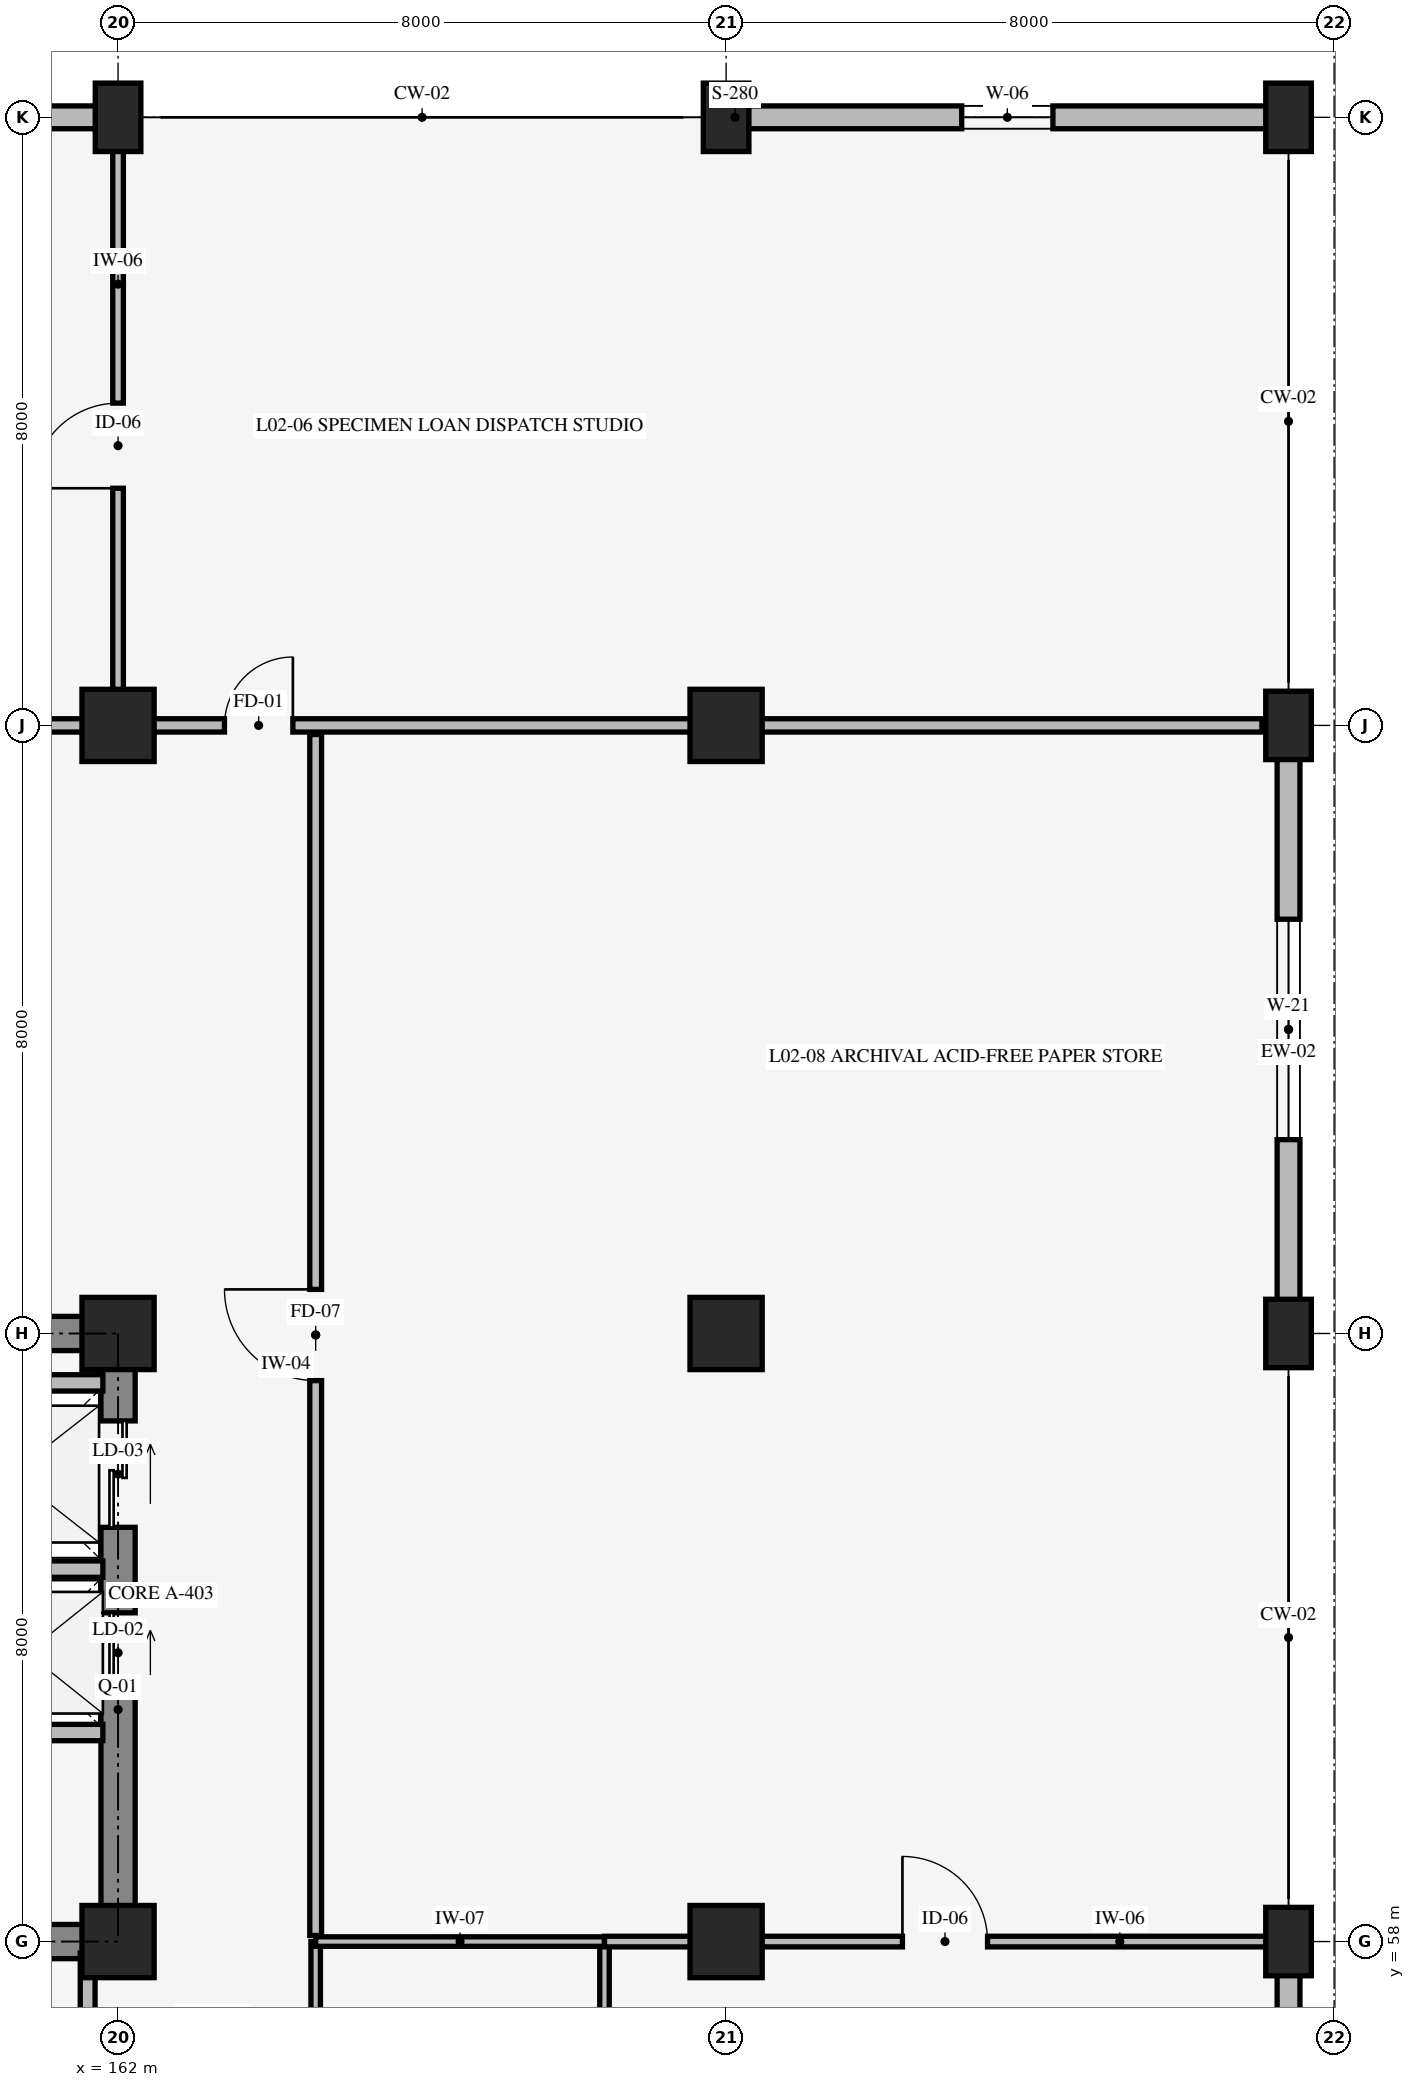
"""IFC4 building model, lengths in metres.
Left out: names, types, materials, properties, quantities, classifications, styles, units other than length and angle.
Written with IfcOpenShell. Run it as: python <this file> out.ifc"""

import sys

from ifc_helpers import new_model, si_unit, direction, frame, frame_2d, origin, origin_2d, place, context, subcontext, project, spatial, rectangle, extrude, element, fill, save


model = new_model("IFC4")
c1 = context("Model", 3, precision=1e-05, world=origin(), true_north=direction((0.0, 1.0)))
c2 = subcontext(c1, "Body", "Model", "MODEL_VIEW")
j1 = project(units=[si_unit("LENGTHUNIT", "METRE"), si_unit("PLANEANGLEUNIT", "RADIAN")], contexts=[c1])
p1 = place(None, origin())
s1 = spatial("IfcSite", under=j1, at=p1, CompositionType="ELEMENT")
p2 = place(p1, origin())
s2 = spatial("IfcBuilding", under=s1, at=p2, CompositionType="ELEMENT")
p3 = place(p2, frame((0.0, 0.0, 5.4)))
s3 = spatial("IfcBuildingStorey", under=s2, at=p3, CompositionType="ELEMENT", Elevation=5.4)
p4 = place(p3, frame((154.0, 58.0, 0.0), z_axis=(0.0, 0.0, 1.0), x_axis=(1.0, 0.0, 0.0)))
e1 = element("IfcWall", 1, at=p4, inside=s3, PredefinedType="SHEAR", context=c2, shape_type="SweptSolid", body=[
    extrude(rectangle(XDim=8.0, YDim=0.45, at=frame_2d((4.0, 0.0))), origin(), (0.0, 0.0, 1.0), 4.55),
])
p5 = place(p4, frame((1.4, 0.0, 0.0)))
e2 = element("IfcOpeningElement", 2, at=p5, cuts=e1, PredefinedType="OPENING", context=c2, shape_type="SweptSolid", body=[
    extrude(rectangle(XDim=1.3, YDim=2.15, at=frame_2d((0.65, 1.075))), frame((0.0, 0.235, 0.0), z_axis=(0.0, -1.0, 0.0), x_axis=(1.0, 0.0, 0.0)), (0.0, 0.0, 1.0), 0.47),
])
p6 = place(p4, frame((5.3, 0.0, 0.0)))
e3 = element("IfcOpeningElement", 3, at=p6, cuts=e1, PredefinedType="OPENING", context=c2, shape_type="SweptSolid", body=[
    extrude(rectangle(XDim=1.1, YDim=2.2, at=frame_2d((0.55, 1.1))), frame((0.0, 0.235, 0.0), z_axis=(0.0, -1.0, 0.0), x_axis=(1.0, 0.0, 0.0)), (0.0, 0.0, 1.0), 0.47),
])
p7 = place(p3, frame((162.0, 58.0, 0.0), z_axis=(0.0, 0.0, 1.0), x_axis=(0.0, 1.0, 0.0)))
e4 = element("IfcWall", 4, at=p7, inside=s3, PredefinedType="SHEAR", context=c2, shape_type="SweptSolid", body=[
    extrude(rectangle(XDim=8.0, YDim=0.45, at=frame_2d((4.0, 0.0))), origin(), (0.0, 0.0, 1.0), 4.55),
])
p8 = place(p7, frame((3.275, 0.0, 0.0)))
e5 = element("IfcOpeningElement", 5, at=p8, cuts=e4, PredefinedType="OPENING", context=c2, shape_type="SweptSolid", body=[
    extrude(rectangle(XDim=1.05, YDim=2.2, at=frame_2d((0.525, 1.1))), frame((0.0, 0.235, 0.0), z_axis=(0.0, -1.0, 0.0), x_axis=(1.0, 0.0, 0.0)), (0.0, 0.0, 1.0), 0.47),
])
p9 = place(p7, frame((5.45, 0.0, 0.0)))
e6 = element("IfcOpeningElement", 6, at=p9, cuts=e4, PredefinedType="OPENING", context=c2, shape_type="SweptSolid", body=[
    extrude(rectangle(XDim=1.4, YDim=2.3, at=frame_2d((0.7, 1.15))), frame((0.0, 0.235, 0.0), z_axis=(0.0, -1.0, 0.0), x_axis=(1.0, 0.0, 0.0)), (0.0, 0.0, 1.0), 0.47),
])
p10 = place(p3, frame((162.0, 66.0, 0.0), z_axis=(0.0, 0.0, 1.0), x_axis=(-1.0, 0.0, 0.0)))
e7 = element("IfcWall", 7, at=p10, inside=s3, PredefinedType="SHEAR", context=c2, shape_type="SweptSolid", body=[
    extrude(rectangle(XDim=8.0, YDim=0.45, at=frame_2d((4.0, 0.0))), origin(), (0.0, 0.0, 1.0), 4.55),
])
for number, where, z_axis, x_axis in (
    (8, (162.0, 58.0, 0.0), (0.0, 0.0, 1.0), (1.0, 0.0, 0.0)),
    (9, (162.0, 66.0, 0.0), (0.0, 0.0, 1.0), (1.0, 0.0, 0.0)),
    (10, (162.0, 74.0, 0.0), (0.0, 0.0, 1.0), (1.0, 0.0, 0.0)),
):
    element("IfcColumn", number, at=place(p3, frame(where, z_axis=z_axis, x_axis=x_axis)), inside=s3, PredefinedType="COLUMN", context=c2, shape_type="SweptSolid", body=[
        extrude(rectangle(XDim=0.95, YDim=0.95, at=origin_2d()), origin(), (0.0, 0.0, 1.0), 4.8),
    ])
p11 = place(p3, frame((162.0, 82.0, 0.0), z_axis=(0.0, 0.0, 1.0), x_axis=(1.0, 0.0, 0.0)))
e11 = element("IfcColumn", 11, at=p11, inside=s3, PredefinedType="COLUMN", context=c2, shape_type="SweptSolid", body=[
    extrude(rectangle(XDim=0.6, YDim=0.9, at=origin_2d()), origin(), (0.0, 0.0, 1.0), 4.8),
])
for number, where, z_axis, x_axis in (
    (12, (170.0, 58.0, 0.0), (0.0, 0.0, 1.0), (1.0, 0.0, 0.0)),
    (13, (170.0, 66.0, 0.0), (0.0, 0.0, 1.0), (1.0, 0.0, 0.0)),
    (14, (170.0, 74.0, 0.0), (0.0, 0.0, 1.0), (1.0, 0.0, 0.0)),
):
    element("IfcColumn", number, at=place(p3, frame(where, z_axis=z_axis, x_axis=x_axis)), inside=s3, PredefinedType="COLUMN", context=c2, shape_type="SweptSolid", body=[
        extrude(rectangle(XDim=0.95, YDim=0.95, at=origin_2d()), origin(), (0.0, 0.0, 1.0), 4.8),
    ])
for number, where, z_axis, x_axis in (
    (15, (170.0, 82.0, 0.0), (0.0, 0.0, 1.0), (1.0, 0.0, 0.0)),
    (16, (177.4, 58.0, 0.0), (0.0, 0.0, 1.0), (1.0, 0.0, 0.0)),
    (17, (177.4, 66.0, 0.0), (0.0, 0.0, 1.0), (1.0, 0.0, 0.0)),
    (18, (177.4, 74.0, 0.0), (0.0, 0.0, 1.0), (1.0, 0.0, 0.0)),
    (19, (177.4, 82.0, 0.0), (0.0, 0.0, 1.0), (1.0, 0.0, 0.0)),
):
    element("IfcColumn", number, at=place(p3, frame(where, z_axis=z_axis, x_axis=x_axis)), inside=s3, PredefinedType="COLUMN", context=c2, shape_type="SweptSolid", body=[
        extrude(rectangle(XDim=0.6, YDim=0.9, at=origin_2d()), origin(), (0.0, 0.0, 1.0), 4.8),
    ])
p12 = place(p3, frame((154.0, 82.0, 0.0), z_axis=(0.0, 0.0, 1.0), x_axis=(1.0, 0.0, 0.0)))
e20 = element("IfcWall", 20, at=p12, inside=s3, PredefinedType="STANDARD", context=c2, shape_type="SweptSolid", body=[
    extrude(rectangle(XDim=8.0, YDim=0.3, at=frame_2d((4.0, 0.0))), origin(), (0.0, 0.0, 1.0), 3.6),
])
p13 = place(p12, frame((2.85, 0.0, 0.85)))
e21 = element("IfcOpeningElement", 21, at=p13, cuts=e20, PredefinedType="OPENING", context=c2, shape_type="SweptSolid", body=[
    extrude(rectangle(XDim=2.3, YDim=1.5, at=frame_2d((1.15, 0.75))), frame((0.0, 0.16, 0.0), z_axis=(0.0, -1.0, 0.0), x_axis=(1.0, 0.0, 0.0)), (0.0, 0.0, 1.0), 0.32),
])
p14 = place(p3, frame((170.0, 82.0, 0.0), z_axis=(0.0, 0.0, 1.0), x_axis=(1.0, 0.0, 0.0)))
e22 = element("IfcWall", 22, at=p14, inside=s3, PredefinedType="STANDARD", context=c2, shape_type="SweptSolid", body=[
    extrude(rectangle(XDim=7.4, YDim=0.3, at=frame_2d((3.7, 0.0))), origin(), (0.0, 0.0, 1.0), 3.6),
])
p15 = place(p14, frame((3.1, 0.0, 0.85)))
e23 = element("IfcOpeningElement", 23, at=p15, cuts=e22, PredefinedType="OPENING", context=c2, shape_type="SweptSolid", body=[
    extrude(rectangle(XDim=1.2, YDim=1.2, at=frame_2d((0.6, 0.6))), frame((0.0, 0.16, 0.0), z_axis=(0.0, -1.0, 0.0), x_axis=(1.0, 0.0, 0.0)), (0.0, 0.0, 1.0), 0.32),
])
p16 = place(p3, frame((177.4, 74.0, 0.0), z_axis=(0.0, 0.0, 1.0), x_axis=(0.0, -1.0, 0.0)))
e24 = element("IfcWall", 24, at=p16, inside=s3, PredefinedType="STANDARD", context=c2, shape_type="SweptSolid", body=[
    extrude(rectangle(XDim=8.0, YDim=0.3, at=frame_2d((4.0, 0.0))), origin(), (0.0, 0.0, 1.0), 3.55),
])
p17 = place(p16, frame((2.55, 0.0, 0.85)))
e25 = element("IfcOpeningElement", 25, at=p17, cuts=e24, PredefinedType="OPENING", context=c2, shape_type="SweptSolid", body=[
    extrude(rectangle(XDim=2.9, YDim=1.7, at=frame_2d((1.45, 0.85))), frame((0.0, 0.16, 0.0), z_axis=(0.0, -1.0, 0.0), x_axis=(1.0, 0.0, 0.0)), (0.0, 0.0, 1.0), 0.32),
])
p18 = place(p3, frame((177.4, 58.0, 0.0), z_axis=(0.0, 0.0, 1.0), x_axis=(0.0, -1.0, 0.0)))
e26 = element("IfcWall", 26, at=p18, inside=s3, PredefinedType="STANDARD", context=c2, shape_type="SweptSolid", body=[
    extrude(rectangle(XDim=8.0, YDim=0.3, at=frame_2d((4.0, 0.0))), origin(), (0.0, 0.0, 1.0), 3.55),
])
p19 = place(p18, frame((3.05, 0.0, 0.85)))
e27 = element("IfcOpeningElement", 27, at=p19, cuts=e26, PredefinedType="OPENING", context=c2, shape_type="SweptSolid", body=[
    extrude(rectangle(XDim=1.9, YDim=1.3, at=frame_2d((0.95, 0.65))), frame((0.0, 0.16, 0.0), z_axis=(0.0, -1.0, 0.0), x_axis=(1.0, 0.0, 0.0)), (0.0, 0.0, 1.0), 0.32),
])
p20 = place(p3, frame((158.45, 62.9, 0.0), z_axis=(0.0, 0.0, 1.0), x_axis=(1.0, 0.0, 0.0)))
e28 = element("IfcWall", 28, at=p20, inside=s3, PredefinedType="STANDARD", context=c2, shape_type="SweptSolid", body=[
    extrude(rectangle(XDim=3.35, YDim=0.215, at=frame_2d((1.675, 0.0))), origin(), (0.0, 0.0, 1.0), 4.5),
])
p21 = place(p3, frame((159.38, 65.35, 0.0), z_axis=(0.0, 0.0, 1.0), x_axis=(1.0, 0.0, 0.0)))
e29 = element("IfcWall", 29, at=p21, inside=s3, PredefinedType="STANDARD", context=c2, shape_type="SweptSolid", body=[
    extrude(rectangle(XDim=2.42, YDim=0.215, at=frame_2d((1.21, 0.0))), origin(), (0.0, 0.0, 1.0), 4.5),
])
p22 = place(p3, frame((158.45, 60.75, 0.0), z_axis=(0.0, 0.0, 1.0), x_axis=(1.0, 0.0, 0.0)))
e30 = element("IfcWall", 30, at=p22, inside=s3, PredefinedType="STANDARD", context=c2, shape_type="SweptSolid", body=[
    extrude(rectangle(XDim=3.35, YDim=0.215, at=frame_2d((1.675, 0.0))), origin(), (0.0, 0.0, 1.0), 4.5),
])
p23 = place(p3, frame((161.6, 55.2, 0.0), z_axis=(0.0, 0.0, 1.0), x_axis=(0.0, 1.0, 0.0)))
e31 = element("IfcWall", 31, at=p23, inside=s3, PredefinedType="STANDARD", context=c2, shape_type="SweptSolid", body=[
    extrude(rectangle(XDim=2.65, YDim=0.195, at=frame_2d((1.325, 0.0))), origin(), (0.0, 0.0, 1.0), 3.55),
])
p24 = place(p3, frame((164.6, 50.0, 0.0), z_axis=(0.0, 0.0, 1.0), x_axis=(0.0, 1.0, 0.0)))
e32 = element("IfcWall", 32, at=p24, inside=s3, PredefinedType="STANDARD", context=c2, shape_type="SweptSolid", body=[
    extrude(rectangle(XDim=8.0, YDim=0.125, at=frame_2d((4.0, 0.0))), origin(), (0.0, 0.0, 1.0), 4.5),
])
p25 = place(p24, frame((0.9, 0.0, 0.0)))
e33 = element("IfcOpeningElement", 33, at=p25, cuts=e32, PredefinedType="OPENING", context=c2, shape_type="SweptSolid", body=[
    extrude(rectangle(XDim=0.96, YDim=2.08, at=frame_2d((0.48, 1.04))), frame((0.0, 0.073, 0.0), z_axis=(0.0, -1.0, 0.0), x_axis=(1.0, 0.0, 0.0)), (0.0, 0.0, 1.0), 0.145),
])
p26 = place(p24, frame((3.55, 0.0, 0.0)))
e34 = element("IfcOpeningElement", 34, at=p26, cuts=e32, PredefinedType="OPENING", context=c2, shape_type="SweptSolid", body=[
    extrude(rectangle(XDim=0.88, YDim=2.05, at=frame_2d((0.44, 1.025))), frame((0.0, 0.073, 0.0), z_axis=(0.0, -1.0, 0.0), x_axis=(1.0, 0.0, 0.0)), (0.0, 0.0, 1.0), 0.145),
])
p27 = place(p24, frame((6.15, 0.0, 0.0)))
e35 = element("IfcOpeningElement", 35, at=p27, cuts=e32, PredefinedType="OPENING", context=c2, shape_type="SweptSolid", body=[
    extrude(rectangle(XDim=0.92, YDim=2.05, at=frame_2d((0.46, 1.025))), frame((0.0, 0.073, 0.0), z_axis=(0.0, -1.0, 0.0), x_axis=(1.0, 0.0, 0.0)), (0.0, 0.0, 1.0), 0.145),
])
p28 = place(p3, frame((168.4, 50.0, 0.0), z_axis=(0.0, 0.0, 1.0), x_axis=(0.0, 1.0, 0.0)))
e36 = element("IfcWall", 36, at=p28, inside=s3, PredefinedType="STANDARD", context=c2, shape_type="SweptSolid", body=[
    extrude(rectangle(XDim=8.0, YDim=0.125, at=frame_2d((4.0, 0.0))), origin(), (0.0, 0.0, 1.0), 4.5),
])
p29 = place(p3, frame((164.6, 58.0, 0.0), z_axis=(0.0, 0.0, 1.0), x_axis=(1.0, 0.0, 0.0)))
e37 = element("IfcWall", 37, at=p29, inside=s3, PredefinedType="STANDARD", context=c2, shape_type="SweptSolid", body=[
    extrude(rectangle(XDim=3.8, YDim=0.125, at=frame_2d((1.9, 0.0))), origin(), (0.0, 0.0, 1.0), 3.6),
])
p30 = place(p3, frame((168.4, 58.0, 0.0), z_axis=(0.0, 0.0, 1.0), x_axis=(1.0, 0.0, 0.0)))
e38 = element("IfcWall", 38, at=p30, inside=s3, PredefinedType="STANDARD", context=c2, shape_type="SweptSolid", body=[
    extrude(rectangle(XDim=8.96, YDim=0.14, at=frame_2d((4.48, 0.0))), origin(), (0.0, 0.0, 1.0), 3.6),
])
p31 = place(p30, frame((3.92, 0.0, 0.0)))
e39 = element("IfcOpeningElement", 39, at=p31, cuts=e38, PredefinedType="OPENING", context=c2, shape_type="SweptSolid", body=[
    extrude(rectangle(XDim=1.12, YDim=2.12, at=frame_2d((0.56, 1.06))), frame((0.0, 0.08, 0.0), z_axis=(0.0, -1.0, 0.0), x_axis=(1.0, 0.0, 0.0)), (0.0, 0.0, 1.0), 0.16),
])
p32 = place(p3, frame((164.6, 58.08, 0.0), z_axis=(0.0, 0.0, 1.0), x_axis=(0.0, 1.0, 0.0)))
e40 = element("IfcWall", 40, at=p32, inside=s3, PredefinedType="STANDARD", context=c2, shape_type="SweptSolid", body=[
    extrude(rectangle(XDim=15.8, YDim=0.155, at=frame_2d((7.9, 0.0))), origin(), (0.0, 0.0, 1.0), 4.5),
])
p33 = place(p32, frame((7.3, 0.0, 0.0)))
e41 = element("IfcOpeningElement", 41, at=p33, cuts=e40, PredefinedType="OPENING", context=c2, shape_type="SweptSolid", body=[
    extrude(rectangle(XDim=1.2, YDim=2.1, at=frame_2d((0.6, 1.05))), frame((0.0, 0.087, 0.0), z_axis=(0.0, -1.0, 0.0), x_axis=(1.0, 0.0, 0.0)), (0.0, 0.0, 1.0), 0.175),
])
p34 = place(p3, frame((130.35, 74.0, 0.0), z_axis=(0.0, 0.0, 1.0), x_axis=(1.0, 0.0, 0.0)))
e42 = element("IfcWall", 42, at=p34, inside=s3, PredefinedType="STANDARD", context=c2, shape_type="SweptSolid", body=[
    extrude(rectangle(XDim=31.3, YDim=0.175, at=frame_2d((15.65, 0.0))), origin(), (0.0, 0.0, 1.0), 3.6),
])
p35 = place(p34, frame((3.3, 0.0, 0.0)))
e43 = element("IfcOpeningElement", 43, at=p35, cuts=e42, PredefinedType="OPENING", context=c2, shape_type="SweptSolid", body=[
    extrude(rectangle(XDim=1.45, YDim=2.2, at=frame_2d((0.725, 1.1))), frame((0.0, 0.098, 0.0), z_axis=(0.0, -1.0, 0.0), x_axis=(1.0, 0.0, 0.0)), (0.0, 0.0, 1.0), 0.195),
])
p36 = place(p3, frame((162.0, 74.12, 0.0), z_axis=(0.0, 0.0, 1.0), x_axis=(0.0, 1.0, 0.0)))
e44 = element("IfcWall", 44, at=p36, inside=s3, PredefinedType="STANDARD", context=c2, shape_type="SweptSolid", body=[
    extrude(rectangle(XDim=7.83, YDim=0.14, at=frame_2d((3.915, 0.0))), origin(), (0.0, 0.0, 1.0), 3.55),
])
p37 = place(p36, frame((3.0, 0.0, 0.0)))
e45 = element("IfcOpeningElement", 45, at=p37, cuts=e44, PredefinedType="OPENING", context=c2, shape_type="SweptSolid", body=[
    extrude(rectangle(XDim=1.12, YDim=2.12, at=frame_2d((0.56, 1.06))), frame((0.0, 0.08, 0.0), z_axis=(0.0, -1.0, 0.0), x_axis=(1.0, 0.0, 0.0)), (0.0, 0.0, 1.0), 0.16),
])
p38 = place(p3, frame((162.35, 74.0, 0.0), z_axis=(0.0, 0.0, 1.0), x_axis=(1.0, 0.0, 0.0)))
e46 = element("IfcWall", 46, at=p38, inside=s3, PredefinedType="STANDARD", context=c2, shape_type="SweptSolid", body=[
    extrude(rectangle(XDim=14.7, YDim=0.175, at=frame_2d((7.35, 0.0))), origin(), (0.0, 0.0, 1.0), 3.6),
])
p39 = place(p38, frame((1.05, 0.0, 0.0)))
e47 = element("IfcOpeningElement", 47, at=p39, cuts=e46, PredefinedType="OPENING", context=c2, shape_type="SweptSolid", body=[
    extrude(rectangle(XDim=0.9, YDim=2.1, at=frame_2d((0.45, 1.05))), frame((0.0, 0.098, 0.0), z_axis=(0.0, -1.0, 0.0), x_axis=(1.0, 0.0, 0.0)), (0.0, 0.0, 1.0), 0.195),
])
p40 = place(p15, origin())
e48 = element("IfcWindow", 48, at=p40, inside=s3, PartitioningType="SINGLE_PANEL", PredefinedType="WINDOW", context=c2, shape_type="SweptSolid", body=[
    extrude(rectangle(XDim=1.2, YDim=1.2, at=frame_2d((0.6, 0.6))), frame((0.0, 0.03, 0.0), z_axis=(0.0, -1.0, 0.0), x_axis=(1.0, 0.0, 0.0)), (0.0, 0.0, 1.0), 0.06),
])
fill(e23, e48)
p41 = place(p17, origin())
e49 = element("IfcWindow", 49, at=p41, inside=s3, PartitioningType="SINGLE_PANEL", PredefinedType="WINDOW", context=c2, shape_type="SweptSolid", body=[
    extrude(rectangle(XDim=2.9, YDim=1.7, at=frame_2d((1.45, 0.85))), frame((0.0, 0.03, 0.0), z_axis=(0.0, -1.0, 0.0), x_axis=(1.0, 0.0, 0.0)), (0.0, 0.0, 1.0), 0.06),
])
fill(e25, e49)
p42 = place(p8, origin())
e50 = element("IfcDoor", 50, at=p42, inside=s3, OperationType="SLIDING_TO_RIGHT", PredefinedType="DOOR", context=c2, shape_type="SweptSolid", body=[
    extrude(rectangle(XDim=1.05, YDim=2.2, at=frame_2d((0.525, 1.1))), frame((0.0, 0.025, 0.0), z_axis=(0.0, -1.0, 0.0), x_axis=(1.0, 0.0, 0.0)), (0.0, 0.0, 1.0), 0.05),
])
fill(e5, e50)
p43 = place(p9, origin())
e51 = element("IfcDoor", 51, at=p43, inside=s3, OperationType="DOUBLE_DOOR_SLIDING", PredefinedType="DOOR", context=c2, shape_type="SweptSolid", body=[
    extrude(rectangle(XDim=1.4, YDim=2.3, at=frame_2d((0.7, 1.15))), frame((0.0, 0.025, 0.0), z_axis=(0.0, -1.0, 0.0), x_axis=(1.0, 0.0, 0.0)), (0.0, 0.0, 1.0), 0.05),
])
fill(e6, e51)
p44 = place(p31, origin())
e52 = element("IfcDoor", 52, at=p44, inside=s3, OperationType="SINGLE_SWING_LEFT", PredefinedType="DOOR", context=c2, shape_type="SweptSolid", body=[
    extrude(rectangle(XDim=1.12, YDim=2.12, at=frame_2d((0.56, 1.06))), frame((0.0, 0.025, 0.0), z_axis=(0.0, -1.0, 0.0), x_axis=(1.0, 0.0, 0.0)), (0.0, 0.0, 1.0), 0.05),
])
fill(e39, e52)
p45 = place(p33, origin())
e53 = element("IfcDoor", 53, at=p45, inside=s3, OperationType="SINGLE_SWING_RIGHT", PredefinedType="DOOR", context=c2, shape_type="SweptSolid", body=[
    extrude(rectangle(XDim=1.2, YDim=2.1, at=frame_2d((0.6, 1.05))), frame((0.0, 0.025, 0.0), z_axis=(0.0, -1.0, 0.0), x_axis=(1.0, 0.0, 0.0)), (0.0, 0.0, 1.0), 0.05),
])
fill(e41, e53)
p46 = place(p37, origin())
e54 = element("IfcDoor", 54, at=p46, inside=s3, OperationType="SINGLE_SWING_LEFT", PredefinedType="DOOR", context=c2, shape_type="SweptSolid", body=[
    extrude(rectangle(XDim=1.12, YDim=2.12, at=frame_2d((0.56, 1.06))), frame((0.0, 0.025, 0.0), z_axis=(0.0, -1.0, 0.0), x_axis=(1.0, 0.0, 0.0)), (0.0, 0.0, 1.0), 0.05),
])
fill(e45, e54)
p47 = place(p39, origin())
e55 = element("IfcDoor", 55, at=p47, inside=s3, OperationType="SINGLE_SWING_RIGHT", PredefinedType="DOOR", context=c2, shape_type="SweptSolid", body=[
    extrude(rectangle(XDim=0.9, YDim=2.1, at=frame_2d((0.45, 1.05))), frame((0.0, 0.025, 0.0), z_axis=(0.0, -1.0, 0.0), x_axis=(1.0, 0.0, 0.0)), (0.0, 0.0, 1.0), 0.05),
])
fill(e47, e55)
save(model, sys.argv[1])
